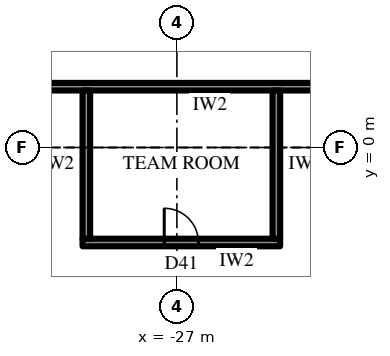
"""IFC4 building model, lengths in metres.
Left out: names, types, materials, properties, quantities, classifications, styles, units other than length and angle.
Written with IfcOpenShell. Run it as: python <this file> out.ifc"""

import sys

from ifc_helpers import new_model, si_unit, direction, frame, frame_2d, origin, place, context, subcontext, project, spatial, rectangle, extrude, element, fill, save


model = new_model("IFC4")
c1 = context("Model", 3, precision=1e-05, world=origin(), true_north=direction((0.0, 1.0)))
c2 = subcontext(c1, "Body", "Model", "MODEL_VIEW")
j1 = project(units=[si_unit("LENGTHUNIT", "METRE"), si_unit("PLANEANGLEUNIT", "RADIAN")], contexts=[c1])
p1 = place(None, origin())
s1 = spatial("IfcSite", under=j1, at=p1, CompositionType="ELEMENT")
p2 = place(p1, origin())
s2 = spatial("IfcBuilding", under=s1, at=p2, CompositionType="ELEMENT")
p3 = place(p2, frame((0.0, 0.0, 174.1)))
s3 = spatial("IfcBuildingStorey", under=s2, at=p3, CompositionType="ELEMENT", Elevation=174.1)
p4 = place(p3, frame((-34.656, -2.675, 0.0), z_axis=(0.0, 0.0, 1.0), x_axis=(0.500003084452, -0.866023622968, 0.0)))
e1 = element("IfcWall", 1, at=p4, inside=s3, PredefinedType="SOLIDWALL", context=c2, shape_type="SweptSolid", body=[
    extrude(rectangle(XDim=30.022, YDim=0.3, at=frame_2d((15.011, 0.0))), origin(), (0.0, 0.0, 1.0), 2.75),
])
p5 = place(p4, frame((1.052, 0.0, 0.6)))
e2 = element("IfcOpeningElement", 2, at=p5, cuts=e1, PredefinedType="OPENING", context=c2, shape_type="SweptSolid", body=[
    extrude(rectangle(XDim=2.9, YDim=1.9, at=frame_2d((1.45, 0.95))), frame((0.0, 0.16, 0.0), z_axis=(0.0, -1.0, 0.0), x_axis=(1.0, 0.0, 0.0)), (0.0, 0.0, 1.0), 0.32),
])
p6 = place(p4, frame((6.056, 0.0, 0.6)))
e3 = element("IfcOpeningElement", 3, at=p6, cuts=e1, PredefinedType="OPENING", context=c2, shape_type="SweptSolid", body=[
    extrude(rectangle(XDim=2.9, YDim=1.9, at=frame_2d((1.45, 0.95))), frame((0.0, 0.16, 0.0), z_axis=(0.0, -1.0, 0.0), x_axis=(1.0, 0.0, 0.0)), (0.0, 0.0, 1.0), 0.32),
])
p7 = place(p4, frame((11.909, 0.0, 0.0)))
e4 = element("IfcOpeningElement", 4, at=p7, cuts=e1, PredefinedType="OPENING", context=c2, shape_type="SweptSolid", body=[
    extrude(rectangle(XDim=1.2, YDim=2.4, at=frame_2d((0.6, 1.2))), frame((0.0, 0.16, 0.0), z_axis=(0.0, -1.0, 0.0), x_axis=(1.0, 0.0, 0.0)), (0.0, 0.0, 1.0), 0.32),
])
p8 = place(p4, frame((16.063, 0.0, 0.6)))
e5 = element("IfcOpeningElement", 5, at=p8, cuts=e1, PredefinedType="OPENING", context=c2, shape_type="SweptSolid", body=[
    extrude(rectangle(XDim=2.9, YDim=1.9, at=frame_2d((1.45, 0.95))), frame((0.0, 0.16, 0.0), z_axis=(0.0, -1.0, 0.0), x_axis=(1.0, 0.0, 0.0)), (0.0, 0.0, 1.0), 0.32),
])
p9 = place(p4, frame((21.067, 0.0, 0.6)))
e6 = element("IfcOpeningElement", 6, at=p9, cuts=e1, PredefinedType="OPENING", context=c2, shape_type="SweptSolid", body=[
    extrude(rectangle(XDim=2.9, YDim=1.9, at=frame_2d((1.45, 0.95))), frame((0.0, 0.16, 0.0), z_axis=(0.0, -1.0, 0.0), x_axis=(1.0, 0.0, 0.0)), (0.0, 0.0, 1.0), 0.32),
])
p10 = place(p4, frame((26.07, 0.0, 0.6)))
e7 = element("IfcOpeningElement", 7, at=p10, cuts=e1, PredefinedType="OPENING", context=c2, shape_type="SweptSolid", body=[
    extrude(rectangle(XDim=2.9, YDim=1.9, at=frame_2d((1.45, 0.95))), frame((0.0, 0.16, 0.0), z_axis=(0.0, -1.0, 0.0), x_axis=(1.0, 0.0, 0.0)), (0.0, 0.0, 1.0), 0.32),
])
p11 = place(p3, frame((-18.6, 1.6, 0.0), z_axis=(0.0, 0.0, 1.0), x_axis=(-1.0, 0.0, 0.0)))
e8 = element("IfcWall", 8, at=p11, inside=s3, PredefinedType="PARTITIONING", context=c2, shape_type="SweptSolid", body=[
    extrude(rectangle(XDim=15.059, YDim=0.2, at=frame_2d((7.53, 0.0))), origin(), (0.0, 0.0, 1.0), 4.0),
])
p12 = place(p11, frame((1.006, 0.0, 0.0)))
e9 = element("IfcOpeningElement", 9, at=p12, cuts=e8, PredefinedType="OPENING", context=c2, shape_type="SweptSolid", body=[
    extrude(rectangle(XDim=1.0, YDim=2.2, at=frame_2d((0.5, 1.1))), frame((0.0, 0.11, 0.0), z_axis=(0.0, -1.0, 0.0), x_axis=(1.0, 0.0, 0.0)), (0.0, 0.0, 1.0), 0.22),
])
p13 = place(p3, frame((-24.283, -2.5, 0.0), z_axis=(0.0, 0.0, 1.0), x_axis=(-1.0, 0.0, 0.0)))
e10 = element("IfcWall", 10, at=p13, inside=s3, PredefinedType="PARTITIONING", context=c2, shape_type="SweptSolid", body=[
    extrude(rectangle(XDim=5.2, YDim=0.2, at=frame_2d((2.6, 0.0))), origin(), (0.0, 0.0, 1.0), 4.0),
])
p14 = place(p13, frame((2.15, 0.0, 0.0)))
e11 = element("IfcOpeningElement", 11, at=p14, cuts=e10, PredefinedType="OPENING", context=c2, shape_type="SweptSolid", body=[
    extrude(rectangle(XDim=0.9, YDim=2.2, at=frame_2d((0.45, 1.1))), frame((0.0, 0.11, 0.0), z_axis=(0.0, -1.0, 0.0), x_axis=(1.0, 0.0, 0.0)), (0.0, 0.0, 1.0), 0.22),
])
for number, where, z_axis, x_axis in (
    (12, (-24.383, 1.5, 0.0), (0.0, 0.0, 1.0), (0.0, -1.0, 0.0)),
    (13, (-29.383, 1.5, 0.0), (0.0, 0.0, 1.0), (0.0, -1.0, 0.0)),
):
    element("IfcWall", number, at=place(p3, frame(where, z_axis=z_axis, x_axis=x_axis)), inside=s3, PredefinedType="PARTITIONING", context=c2, shape_type="SweptSolid", body=[
        extrude(rectangle(XDim=3.9, YDim=0.2, at=frame_2d((1.95, 0.0))), origin(), (0.0, 0.0, 1.0), 4.0),
    ])
p15 = place(p14, frame((0.9, 0.0, 0.0), z_axis=(0.0, 0.0, 1.0), x_axis=(-1.0, 0.0, 0.0)))
e14 = element("IfcDoor", 14, at=p15, inside=s3, OperationType="SINGLE_SWING_RIGHT", PredefinedType="DOOR", context=c2, shape_type="SweptSolid", body=[
    extrude(rectangle(XDim=0.9, YDim=2.2, at=frame_2d((0.45, 1.1))), frame((0.0, 0.025, 0.0), z_axis=(0.0, -1.0, 0.0), x_axis=(1.0, 0.0, 0.0)), (0.0, 0.0, 1.0), 0.05),
])
fill(e11, e14)
save(model, sys.argv[1])
